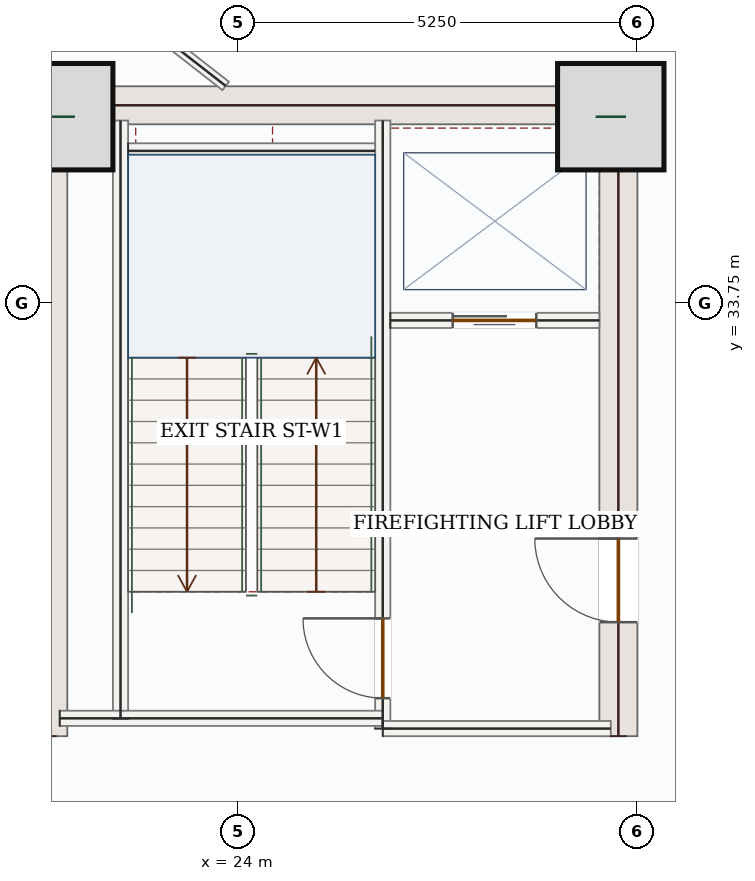
"""IFC4 building model, lengths in metres.
Left out: names, types, materials, properties, quantities, classifications, styles, units other than length and angle.
Written with IfcOpenShell. Run it as: python <this file> out.ifc"""

import sys

from ifc_helpers import new_model, si_unit, direction, frame, frame_2d, origin, origin_2d, place, context, subcontext, project, spatial, rectangle, extrude, source, transform, mapped, element, fill, save


model = new_model("IFC4")
c1 = context("Model", 3, precision=1e-05, world=origin(), true_north=direction((0.0, 1.0)))
c2 = subcontext(c1, "Body", "Model", "MODEL_VIEW")
j1 = project(units=[si_unit("LENGTHUNIT", "METRE"), si_unit("PLANEANGLEUNIT", "RADIAN")], contexts=[c1])
p1 = place(None, origin())
s1 = spatial("IfcSite", under=j1, at=p1, CompositionType="ELEMENT")
p2 = place(p1, origin())
s2 = spatial("IfcBuilding", under=s1, at=p2, CompositionType="ELEMENT")
p3 = place(p2, frame((0.0, 0.0, 108.9)))
s3 = spatial("IfcBuildingStorey", under=s2, at=p3, CompositionType="ELEMENT", Elevation=108.9)
m1 = source(origin(), c2, "Body", "SweptSolid", [
    extrude(rectangle(XDim=8.55, YDim=0.5, at=frame_2d((4.275, 0.0))), origin(), (0.0, 0.0, 1.0), 3.95),
])
p4 = place(p3, frame((21.5, 28.05, 0.0), z_axis=(0.0, 0.0, 1.0), x_axis=(0.0, 1.0, 0.0)))
e1 = element("IfcWall", 1, at=p4, inside=s3, PredefinedType="SHEAR", context=c2, shape_type="MappedRepresentation", body=[
    mapped(m1, transform((0.0, 0.0, 0.0), x_axis=(1.0, 0.0, 0.0), y_axis=(0.0, 1.0, 0.0), z_axis=(0.0, 0.0, 1.0), scale=1.0)),
])
p5 = place(p3, frame((29.0, 28.05, 0.0), z_axis=(0.0, 0.0, 1.0), x_axis=(0.0, 1.0, 0.0)))
e2 = element("IfcWall", 2, at=p5, inside=s3, PredefinedType="SHEAR", context=c2, shape_type="SweptSolid", body=[
    extrude(rectangle(XDim=8.55, YDim=0.5, at=frame_2d((4.275, 0.0))), origin(), (0.0, 0.0, 1.0), 3.95),
])
p6 = place(p5, frame((1.5, 0.0, 0.0)))
e3 = element("IfcOpeningElement", 3, at=p6, cuts=e2, PredefinedType="OPENING", context=c2, shape_type="SweptSolid", body=[
    extrude(rectangle(XDim=1.1, YDim=2.2, at=frame_2d((0.55, 1.1))), frame((0.0, 0.26, 0.0), z_axis=(0.0, -1.0, 0.0), x_axis=(1.0, 0.0, 0.0)), (0.0, 0.0, 1.0), 0.52),
])
m2 = source(origin(), c2, "Body", "SweptSolid", [
    extrude(rectangle(XDim=7.0, YDim=0.5, at=frame_2d((3.5, 0.0))), origin(), (0.0, 0.0, 1.0), 3.95),
])
p7 = place(p3, frame((21.75, 36.35, 0.0), z_axis=(0.0, 0.0, 1.0), x_axis=(1.0, 0.0, 0.0)))
e4 = element("IfcWall", 4, at=p7, inside=s3, PredefinedType="SHEAR", context=c2, shape_type="MappedRepresentation", body=[
    mapped(m2, transform((0.0, 0.0, 0.0), x_axis=(1.0, 0.0, 0.0), y_axis=(0.0, 1.0, 0.0), z_axis=(0.0, 0.0, 1.0), scale=1.0)),
])
m3 = source(origin(), c2, "Body", "SweptSolid", [
    extrude(rectangle(XDim=1.4, YDim=1.4, at=origin_2d()), origin(), (0.0, 0.0, 1.0), 4.2),
])
for number, where, z_axis, x_axis in (
    (5, (21.65, 36.2, 0.0), (0.0, 0.0, 1.0), (1.0, 0.0, 0.0)),
    (6, (28.9, 36.2, 0.0), (0.0, 0.0, 1.0), (1.0, 0.0, 0.0)),
):
    element("IfcColumn", number, at=place(p3, frame(where, z_axis=z_axis, x_axis=x_axis)), inside=s3, PredefinedType="COLUMN", context=c2, shape_type="MappedRepresentation", body=[
        mapped(m3, transform((0.0, 0.0, 0.0), x_axis=(1.0, 0.0, 0.0), y_axis=(0.0, 1.0, 0.0), z_axis=(0.0, 0.0, 1.0), scale=1.0)),
    ])
m4 = source(origin(), c2, "Body", "SweptSolid", [
    extrude(rectangle(XDim=5.258, YDim=0.32, at=frame_2d((2.629, 0.0))), origin(), (0.0, 0.0, 1.0), 3.95),
])
p8 = place(p3, frame((18.94, 35.542, 0.0), z_axis=(0.0, 0.0, 1.0), x_axis=(0.707106781187, 0.707106781187, 0.0)))
e7 = element("IfcWall", 7, at=p8, inside=s3, PredefinedType="SOLIDWALL", context=c2, shape_type="MappedRepresentation", body=[
    mapped(m4, transform((0.0, 0.0, 0.0), x_axis=(1.0, 0.0, 0.0), y_axis=(0.0, 1.0, 0.0), z_axis=(0.0, 0.0, 1.0), scale=1.0)),
])
m5 = source(origin(), c2, "Body", "SweptSolid", [
    extrude(rectangle(XDim=7.87, YDim=0.2, at=frame_2d((3.935, 0.0))), origin(), (0.0, 0.0, 1.0), 3.95),
])
p9 = place(p3, frame((22.45, 28.28, 0.0), z_axis=(0.0, 0.0, 1.0), x_axis=(0.0, 1.0, 0.0)))
e8 = element("IfcWall", 8, at=p9, inside=s3, PredefinedType="SOLIDWALL", context=c2, shape_type="MappedRepresentation", body=[
    mapped(m5, transform((0.0, 0.0, 0.0), x_axis=(1.0, 0.0, 0.0), y_axis=(0.0, 1.0, 0.0), z_axis=(0.0, 0.0, 1.0), scale=1.0)),
])
p10 = place(p3, frame((25.9, 28.15, 0.0), z_axis=(0.0, 0.0, 1.0), x_axis=(0.0, 1.0, 0.0)))
e9 = element("IfcWall", 9, at=p10, inside=s3, PredefinedType="SOLIDWALL", context=c2, shape_type="SweptSolid", body=[
    extrude(rectangle(XDim=8.0, YDim=0.2, at=frame_2d((4.0, 0.0))), origin(), (0.0, 0.0, 1.0), 3.95),
])
p11 = place(p10, frame((0.4, 0.0, 0.0)))
e10 = element("IfcOpeningElement", 10, at=p11, cuts=e9, PredefinedType="OPENING", context=c2, shape_type="SweptSolid", body=[
    extrude(rectangle(XDim=1.05, YDim=2.15, at=frame_2d((0.525, 1.075))), frame((0.0, 0.11, 0.0), z_axis=(0.0, -1.0, 0.0), x_axis=(1.0, 0.0, 0.0)), (0.0, 0.0, 1.0), 0.22),
])
m6 = source(origin(), c2, "Body", "SweptSolid", [
    extrude(rectangle(XDim=4.25, YDim=0.2, at=frame_2d((2.125, 0.0))), origin(), (0.0, 0.0, 1.0), 3.95),
])
p12 = place(p3, frame((21.65, 28.285, 0.0), z_axis=(0.0, 0.0, 1.0), x_axis=(1.0, 0.0, 0.0)))
e11 = element("IfcWall", 11, at=p12, inside=s3, PredefinedType="SOLIDWALL", context=c2, shape_type="MappedRepresentation", body=[
    mapped(m6, transform((0.0, 0.0, 0.0), x_axis=(1.0, 0.0, 0.0), y_axis=(0.0, 1.0, 0.0), z_axis=(0.0, 0.0, 1.0), scale=1.0)),
])
m7 = source(origin(), c2, "Body", "SweptSolid", [
    extrude(rectangle(XDim=3.0, YDim=0.2, at=frame_2d((1.5, 0.0))), origin(), (0.0, 0.0, 1.0), 3.95),
])
p13 = place(p3, frame((25.9, 28.15, 0.0), z_axis=(0.0, 0.0, 1.0), x_axis=(1.0, 0.0, 0.0)))
e12 = element("IfcWall", 12, at=p13, inside=s3, PredefinedType="SOLIDWALL", context=c2, shape_type="MappedRepresentation", body=[
    mapped(m7, transform((0.0, 0.0, 0.0), x_axis=(1.0, 0.0, 0.0), y_axis=(0.0, 1.0, 0.0), z_axis=(0.0, 0.0, 1.0), scale=1.0)),
])
m8 = source(origin(), c2, "Body", "SweptSolid", [
    extrude(rectangle(XDim=3.25, YDim=0.2, at=frame_2d((1.625, 0.0))), origin(), (0.0, 0.0, 1.0), 3.95),
])
p14 = place(p3, frame((22.55, 35.75, 0.0), z_axis=(0.0, 0.0, 1.0), x_axis=(1.0, 0.0, 0.0)))
e13 = element("IfcWall", 13, at=p14, inside=s3, PredefinedType="SOLIDWALL", context=c2, shape_type="MappedRepresentation", body=[
    mapped(m8, transform((0.0, 0.0, 0.0), x_axis=(1.0, 0.0, 0.0), y_axis=(0.0, 1.0, 0.0), z_axis=(0.0, 0.0, 1.0), scale=1.0)),
])
p15 = place(p3, frame((26.0, 33.52, 0.0), z_axis=(0.0, 0.0, 1.0), x_axis=(1.0, 0.0, 0.0)))
e14 = element("IfcWall", 14, at=p15, inside=s3, PredefinedType="SOLIDWALL", context=c2, shape_type="SweptSolid", body=[
    extrude(rectangle(XDim=2.75, YDim=0.2, at=frame_2d((1.375, 0.0))), origin(), (0.0, 0.0, 1.0), 3.95),
])
p16 = place(p15, frame((0.82, 0.0, 0.0)))
e15 = element("IfcOpeningElement", 15, at=p16, cuts=e14, PredefinedType="OPENING", context=c2, shape_type="SweptSolid", body=[
    extrude(rectangle(XDim=1.1, YDim=2.15, at=frame_2d((0.55, 1.075))), frame((0.0, 0.11, 0.0), z_axis=(0.0, -1.0, 0.0), x_axis=(1.0, 0.0, 0.0)), (0.0, 0.0, 1.0), 0.22),
])
m9 = source(origin(), c2, "Body", "SweptSolid", [
    extrude(rectangle(XDim=2.563, YDim=0.14, at=frame_2d((1.282, 0.0))), origin(), (0.0, 0.0, 1.0), 3.95),
])
p17 = place(p3, frame((21.811, 38.18, 0.0), z_axis=(0.0, 0.0, 1.0), x_axis=(0.789034129839, -0.614349364734, 0.0)))
e16 = element("IfcWall", 16, at=p17, inside=s3, PredefinedType="PARTITIONING", context=c2, shape_type="MappedRepresentation", body=[
    mapped(m9, transform((0.0, 0.0, 0.0), x_axis=(1.0, 0.0, 0.0), y_axis=(0.0, 1.0, 0.0), z_axis=(0.0, 0.0, 1.0), scale=1.0)),
])
m10 = source(origin(), c2, "Body", "SweptSolid", [
    extrude(rectangle(XDim=1.05, YDim=2.15, at=frame_2d((0.525, 1.075))), frame((0.0, 0.025, 0.0), z_axis=(0.0, -1.0, 0.0), x_axis=(1.0, 0.0, 0.0)), (0.0, 0.0, 1.0), 0.05),
])
p18 = place(p11, origin())
e17 = element("IfcDoor", 17, at=p18, inside=s3, OperationType="SINGLE_SWING_RIGHT", PredefinedType="DOOR", context=c2, shape_type="MappedRepresentation", body=[
    mapped(m10, transform((0.0, 0.0, 0.0), x_axis=(1.0, 0.0, 0.0), y_axis=(0.0, 1.0, 0.0), z_axis=(0.0, 0.0, 1.0), scale=1.0)),
])
fill(e10, e17)
m11 = source(origin(), c2, "Body", "SweptSolid", [
    extrude(rectangle(XDim=1.1, YDim=2.15, at=frame_2d((0.55, 1.075))), frame((0.0, 0.025, 0.0), z_axis=(0.0, -1.0, 0.0), x_axis=(1.0, 0.0, 0.0)), (0.0, 0.0, 1.0), 0.05),
])
p19 = place(p16, origin())
e18 = element("IfcDoor", 18, at=p19, inside=s3, OperationType="DOUBLE_DOOR_SLIDING", PredefinedType="DOOR", context=c2, shape_type="MappedRepresentation", body=[
    mapped(m11, transform((0.0, 0.0, 0.0), x_axis=(1.0, 0.0, 0.0), y_axis=(0.0, 1.0, 0.0), z_axis=(0.0, 0.0, 1.0), scale=1.0)),
])
fill(e15, e18)
m12 = source(origin(), c2, "Body", "SweptSolid", [
    extrude(rectangle(XDim=1.1, YDim=2.2, at=frame_2d((0.55, 1.1))), frame((0.0, 0.025, 0.0), z_axis=(0.0, -1.0, 0.0), x_axis=(1.0, 0.0, 0.0)), (0.0, 0.0, 1.0), 0.05),
])
p20 = place(p6, origin())
e19 = element("IfcDoor", 19, at=p20, inside=s3, OperationType="SINGLE_SWING_RIGHT", PredefinedType="DOOR", context=c2, shape_type="MappedRepresentation", body=[
    mapped(m12, transform((0.0, 0.0, 0.0), x_axis=(1.0, 0.0, 0.0), y_axis=(0.0, 1.0, 0.0), z_axis=(0.0, 0.0, 1.0), scale=1.0)),
])
fill(e3, e19)
save(model, sys.argv[1])
